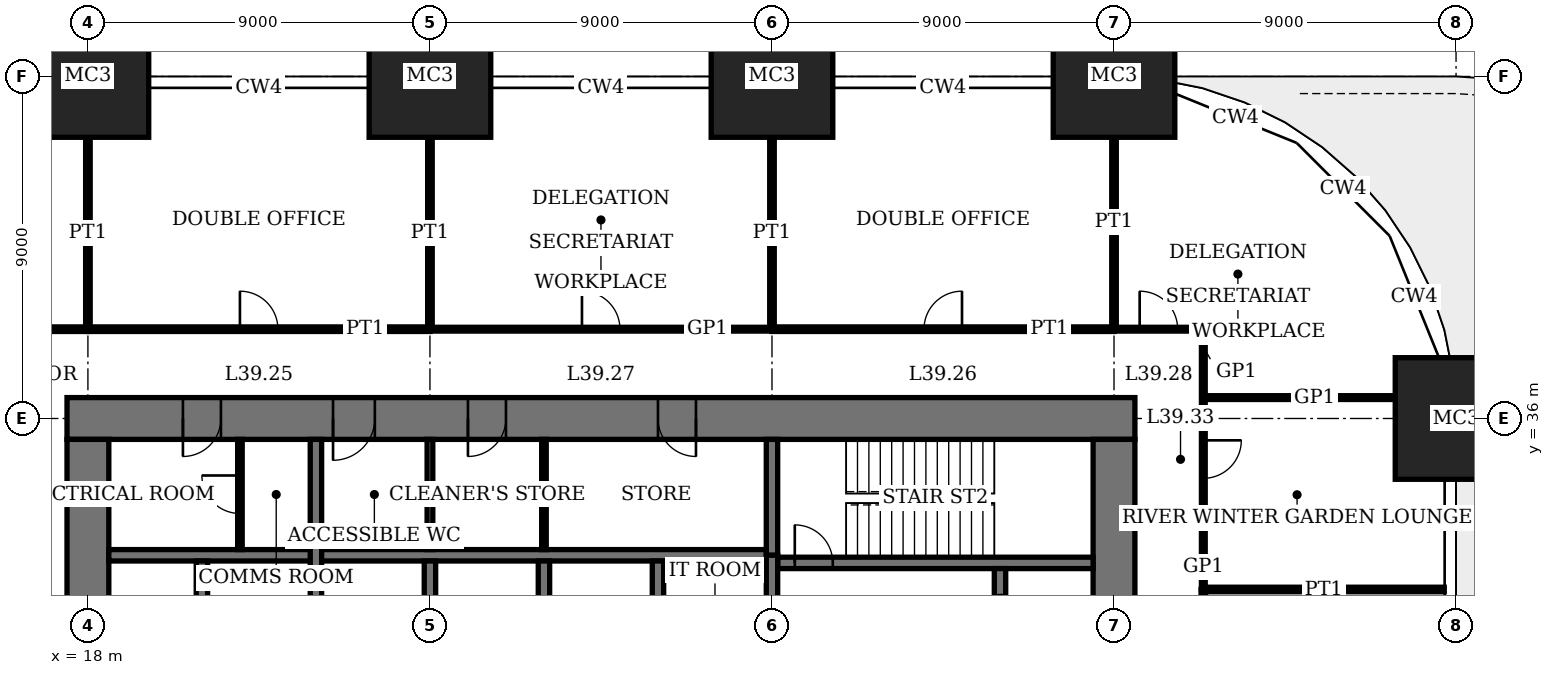
"""IFC4 building model, lengths in metres.
Left out: names, types, materials, properties, quantities, classifications, styles, units other than length and angle.
Written with IfcOpenShell. Run it as: python <this file> out.ifc"""

import sys

from ifc_helpers import new_model, si_unit, direction, frame, frame_2d, origin, origin_2d, place, context, subcontext, project, spatial, rectangle, extrude, element, fill, save


model = new_model("IFC4")
c1 = context("Model", 3, precision=1e-05, world=origin(), true_north=direction((0.0, 1.0)))
c2 = subcontext(c1, "Body", "Model", "MODEL_VIEW")
j1 = project(units=[si_unit("LENGTHUNIT", "METRE"), si_unit("PLANEANGLEUNIT", "RADIAN")], contexts=[c1])
p1 = place(None, origin())
s1 = spatial("IfcSite", under=j1, at=p1, CompositionType="ELEMENT")
p2 = place(p1, origin())
s2 = spatial("IfcBuilding", under=s1, at=p2, CompositionType="ELEMENT")
p3 = place(p2, frame((0.0, 0.0, 162.2)))
s3 = spatial("IfcBuildingStorey", under=s2, at=p3, CompositionType="ELEMENT", Elevation=162.2)
for number, where, z_axis, x_axis in (
    (1, (18.0, 45.0, 0.0), (0.0, 0.0, 1.0), (1.0, 0.0, 0.0)),
    (2, (27.0, 45.0, 0.0), (0.0, 0.0, 1.0), (1.0, 0.0, 0.0)),
    (3, (36.0, 45.0, 0.0), (0.0, 0.0, 1.0), (1.0, 0.0, 0.0)),
    (4, (45.0, 45.0, 0.0), (0.0, 0.0, 1.0), (1.0, 0.0, 0.0)),
    (5, (54.0, 36.0, 0.0), (0.0, 0.0, 1.0), (1.0, 0.0, 0.0)),
):
    element("IfcColumn", number, at=place(p3, frame(where, z_axis=z_axis, x_axis=x_axis)), inside=s3, PredefinedType="COLUMN", context=c2, shape_type="SweptSolid", body=[
        extrude(rectangle(XDim=3.2, YDim=3.2, at=origin_2d()), origin(), (0.0, 0.0, 1.0), 4.0),
    ])
p4 = place(p3, frame((45.55, 36.0, 0.0), z_axis=(0.0, 0.0, 1.0), x_axis=(-1.0, 0.0, 0.0)))
e6 = element("IfcWall", 6, at=p4, inside=s3, PredefinedType="SHEAR", context=c2, shape_type="SweptSolid", body=[
    extrude(rectangle(XDim=28.1, YDim=1.1, at=frame_2d((14.05, 0.0))), origin(), (0.0, 0.0, 1.0), 4.0),
])
p5 = place(p4, frame((11.55, 0.0, 0.0)))
e7 = element("IfcOpeningElement", 7, at=p5, cuts=e6, PredefinedType="OPENING", context=c2, shape_type="SweptSolid", body=[
    extrude(rectangle(XDim=1.0, YDim=2.4, at=frame_2d((0.5, 1.2))), frame((0.0, 0.56, 0.0), z_axis=(0.0, -1.0, 0.0), x_axis=(1.0, 0.0, 0.0)), (0.0, 0.0, 1.0), 1.12),
])
p6 = place(p4, frame((16.55, 0.0, 0.0)))
e8 = element("IfcOpeningElement", 8, at=p6, cuts=e6, PredefinedType="OPENING", context=c2, shape_type="SweptSolid", body=[
    extrude(rectangle(XDim=1.0, YDim=2.4, at=frame_2d((0.5, 1.2))), frame((0.0, 0.56, 0.0), z_axis=(0.0, -1.0, 0.0), x_axis=(1.0, 0.0, 0.0)), (0.0, 0.0, 1.0), 1.12),
])
p7 = place(p4, frame((20.0, 0.0, 0.0)))
e9 = element("IfcOpeningElement", 9, at=p7, cuts=e6, PredefinedType="OPENING", context=c2, shape_type="SweptSolid", body=[
    extrude(rectangle(XDim=1.1, YDim=2.4, at=frame_2d((0.55, 1.2))), frame((0.0, 0.56, 0.0), z_axis=(0.0, -1.0, 0.0), x_axis=(1.0, 0.0, 0.0)), (0.0, 0.0, 1.0), 1.12),
])
p8 = place(p4, frame((24.05, 0.0, 0.0)))
e10 = element("IfcOpeningElement", 10, at=p8, cuts=e6, PredefinedType="OPENING", context=c2, shape_type="SweptSolid", body=[
    extrude(rectangle(XDim=1.0, YDim=2.4, at=frame_2d((0.5, 1.2))), frame((0.0, 0.56, 0.0), z_axis=(0.0, -1.0, 0.0), x_axis=(1.0, 0.0, 0.0)), (0.0, 0.0, 1.0), 1.12),
])
p9 = place(p3, frame((18.0, 35.45, 0.0), z_axis=(0.0, 0.0, 1.0), x_axis=(0.0, -1.0, 0.0)))
e11 = element("IfcWall", 11, at=p9, inside=s3, PredefinedType="SHEAR", context=c2, shape_type="SweptSolid", body=[
    extrude(rectangle(XDim=16.9, YDim=1.1, at=frame_2d((8.45, 0.0))), origin(), (0.0, 0.0, 1.0), 4.0),
])
p10 = place(p9, frame((8.9, 0.0, 0.0)))
e12 = element("IfcOpeningElement", 12, at=p10, cuts=e11, PredefinedType="OPENING", context=c2, shape_type="SweptSolid", body=[
    extrude(rectangle(XDim=1.8, YDim=2.4, at=frame_2d((0.9, 1.2))), frame((0.0, 0.56, 0.0), z_axis=(0.0, -1.0, 0.0), x_axis=(1.0, 0.0, 0.0)), (0.0, 0.0, 1.0), 1.12),
])
p11 = place(p3, frame((45.0, 18.55, 0.0), z_axis=(0.0, 0.0, 1.0), x_axis=(0.0, 1.0, 0.0)))
e13 = element("IfcWall", 13, at=p11, inside=s3, PredefinedType="SHEAR", context=c2, shape_type="SweptSolid", body=[
    extrude(rectangle(XDim=16.9, YDim=1.1, at=frame_2d((8.45, 0.0))), origin(), (0.0, 0.0, 1.0), 4.0),
])
p12 = place(p11, frame((8.9, 0.0, 0.0)))
e14 = element("IfcOpeningElement", 14, at=p12, cuts=e13, PredefinedType="OPENING", context=c2, shape_type="SweptSolid", body=[
    extrude(rectangle(XDim=1.8, YDim=2.4, at=frame_2d((0.9, 1.2))), frame((0.0, 0.56, 0.0), z_axis=(0.0, -1.0, 0.0), x_axis=(1.0, 0.0, 0.0)), (0.0, 0.0, 1.0), 1.12),
])
p13 = place(p3, frame((36.15, 32.2, 0.0), z_axis=(0.0, 0.0, 1.0), x_axis=(1.0, 0.0, 0.0)))
e15 = element("IfcWall", 15, at=p13, inside=s3, PredefinedType="SHEAR", context=c2, shape_type="SweptSolid", body=[
    extrude(rectangle(XDim=8.3, YDim=0.3, at=frame_2d((4.15, 0.0))), origin(), (0.0, 0.0, 1.0), 4.0),
])
p14 = place(p13, frame((0.45, 0.0, 0.0)))
e16 = element("IfcOpeningElement", 16, at=p14, cuts=e15, PredefinedType="OPENING", context=c2, shape_type="SweptSolid", body=[
    extrude(rectangle(XDim=1.0, YDim=2.4, at=frame_2d((0.5, 1.2))), frame((0.0, 0.16, 0.0), z_axis=(0.0, -1.0, 0.0), x_axis=(1.0, 0.0, 0.0)), (0.0, 0.0, 1.0), 0.32),
])
p15 = place(p3, frame((36.0, 32.4, 0.0), z_axis=(0.0, 0.0, 1.0), x_axis=(0.0, 1.0, 0.0)))
e17 = element("IfcWall", 17, at=p15, inside=s3, PredefinedType="SHEAR", context=c2, shape_type="SweptSolid", body=[
    extrude(rectangle(XDim=3.05, YDim=0.3, at=frame_2d((1.525, 0.0))), origin(), (0.0, 0.0, 1.0), 4.0),
])
p16 = place(p3, frame((42.0, 29.55, 0.0), z_axis=(0.0, 0.0, 1.0), x_axis=(0.0, 1.0, 0.0)))
e18 = element("IfcWall", 18, at=p16, inside=s3, PredefinedType="SHEAR", context=c2, shape_type="SweptSolid", body=[
    extrude(rectangle(XDim=2.5, YDim=0.3, at=frame_2d((1.25, 0.0))), origin(), (0.0, 0.0, 1.0), 4.0),
])
p17 = place(p16, frame((0.7, 0.0, 0.0)))
e19 = element("IfcOpeningElement", 19, at=p17, cuts=e18, PredefinedType="OPENING", context=c2, shape_type="SweptSolid", body=[
    extrude(rectangle(XDim=1.1, YDim=2.4, at=frame_2d((0.55, 1.2))), frame((0.0, 0.16, 0.0), z_axis=(0.0, -1.0, 0.0), x_axis=(1.0, 0.0, 0.0)), (0.0, 0.0, 1.0), 0.32),
])
p18 = place(p3, frame((18.55, 32.4, 0.0), z_axis=(0.0, 0.0, 1.0), x_axis=(1.0, 0.0, 0.0)))
e20 = element("IfcWall", 20, at=p18, inside=s3, PredefinedType="SHEAR", context=c2, shape_type="SweptSolid", body=[
    extrude(rectangle(XDim=17.3, YDim=0.3, at=frame_2d((8.65, 0.0))), origin(), (0.0, 0.0, 1.0), 4.0),
])
for number, where, z_axis, x_axis in (
    (21, (33.0, 29.55, 0.0), (0.0, 0.0, 1.0), (0.0, 1.0, 0.0)),
    (22, (30.0, 29.55, 0.0), (0.0, 0.0, 1.0), (0.0, 1.0, 0.0)),
    (23, (27.0, 29.55, 0.0), (0.0, 0.0, 1.0), (0.0, 1.0, 0.0)),
):
    element("IfcWall", number, at=place(p3, frame(where, z_axis=z_axis, x_axis=x_axis)), inside=s3, PredefinedType="SHEAR", context=c2, shape_type="SweptSolid", body=[
        extrude(rectangle(XDim=2.7, YDim=0.3, at=frame_2d((1.35, 0.0))), origin(), (0.0, 0.0, 1.0), 4.0),
    ])
p19 = place(p3, frame((24.0, 29.55, 0.0), z_axis=(0.0, 0.0, 1.0), x_axis=(0.0, 1.0, 0.0)))
e24 = element("IfcWall", 24, at=p19, inside=s3, PredefinedType="SHEAR", context=c2, shape_type="SweptSolid", body=[
    extrude(rectangle(XDim=5.9, YDim=0.3, at=frame_2d((2.95, 0.0))), origin(), (0.0, 0.0, 1.0), 4.0),
])
p20 = place(p3, frame((21.0, 29.55, 0.0), z_axis=(0.0, 0.0, 1.0), x_axis=(0.0, 1.0, 0.0)))
e25 = element("IfcWall", 25, at=p20, inside=s3, PredefinedType="SHEAR", context=c2, shape_type="SweptSolid", body=[
    extrude(rectangle(XDim=2.7, YDim=0.3, at=frame_2d((1.35, 0.0))), origin(), (0.0, 0.0, 1.0), 4.0),
])
p21 = place(p3, frame((36.0, 29.55, 0.0), z_axis=(0.0, 0.0, 1.0), x_axis=(0.0, 1.0, 0.0)))
e26 = element("IfcWall", 26, at=p21, inside=s3, PredefinedType="SHEAR", context=c2, shape_type="SweptSolid", body=[
    extrude(rectangle(XDim=2.85, YDim=0.3, at=frame_2d((1.425, 0.0))), origin(), (0.0, 0.0, 1.0), 4.0),
])
p22 = place(p3, frame((47.35, 31.5, 0.0), z_axis=(0.0, 0.0, 1.0), x_axis=(1.0, 0.0, 0.0)))
e27 = element("IfcWall", 27, at=p22, inside=s3, PredefinedType="PARTITIONING", context=c2, shape_type="SweptSolid", body=[
    extrude(rectangle(XDim=6.34, YDim=0.12, at=frame_2d((3.17, 0.0))), origin(), (0.0, 0.0, 1.0), 3.1),
])
p23 = place(p3, frame((47.35, 36.55, 0.0), z_axis=(0.0, 0.0, 1.0), x_axis=(1.0, 0.0, 0.0)))
e28 = element("IfcWall", 28, at=p23, inside=s3, PredefinedType="PARTITIONING", context=c2, shape_type="SweptSolid", body=[
    extrude(rectangle(XDim=5.05, YDim=0.1, at=frame_2d((2.525, 0.0))), origin(), (0.0, 0.0, 1.0), 3.05),
])
p24 = place(p3, frame((9.0, 38.35, 0.0), z_axis=(0.0, 0.0, 1.0), x_axis=(1.0, 0.0, 0.0)))
e29 = element("IfcWall", 29, at=p24, inside=s3, PredefinedType="PARTITIONING", context=c2, shape_type="SweptSolid", body=[
    extrude(rectangle(XDim=9.0, YDim=0.12, at=frame_2d((4.5, 0.0))), origin(), (0.0, 0.0, 1.0), 3.75),
])
p25 = place(p24, frame((4.0, 0.0, 0.0)))
e30 = element("IfcOpeningElement", 30, at=p25, cuts=e29, PredefinedType="OPENING", context=c2, shape_type="SweptSolid", body=[
    extrude(rectangle(XDim=1.0, YDim=2.4, at=frame_2d((0.5, 1.2))), frame((0.0, 0.07, 0.0), z_axis=(0.0, -1.0, 0.0), x_axis=(1.0, 0.0, 0.0)), (0.0, 0.0, 1.0), 0.14),
])
p26 = place(p3, frame((18.0, 38.35, 0.0), z_axis=(0.0, 0.0, 1.0), x_axis=(1.0, 0.0, 0.0)))
e31 = element("IfcWall", 31, at=p26, inside=s3, PredefinedType="PARTITIONING", context=c2, shape_type="SweptSolid", body=[
    extrude(rectangle(XDim=9.0, YDim=0.12, at=frame_2d((4.5, 0.0))), origin(), (0.0, 0.0, 1.0), 3.75),
])
p27 = place(p26, frame((4.0, 0.0, 0.0)))
e32 = element("IfcOpeningElement", 32, at=p27, cuts=e31, PredefinedType="OPENING", context=c2, shape_type="SweptSolid", body=[
    extrude(rectangle(XDim=1.0, YDim=2.4, at=frame_2d((0.5, 1.2))), frame((0.0, 0.07, 0.0), z_axis=(0.0, -1.0, 0.0), x_axis=(1.0, 0.0, 0.0)), (0.0, 0.0, 1.0), 0.14),
])
p28 = place(p3, frame((36.0, 38.35, 0.0), z_axis=(0.0, 0.0, 1.0), x_axis=(1.0, 0.0, 0.0)))
e33 = element("IfcWall", 33, at=p28, inside=s3, PredefinedType="PARTITIONING", context=c2, shape_type="SweptSolid", body=[
    extrude(rectangle(XDim=9.0, YDim=0.12, at=frame_2d((4.5, 0.0))), origin(), (0.0, 0.0, 1.0), 3.75),
])
p29 = place(p28, frame((4.0, 0.0, 0.0)))
e34 = element("IfcOpeningElement", 34, at=p29, cuts=e33, PredefinedType="OPENING", context=c2, shape_type="SweptSolid", body=[
    extrude(rectangle(XDim=1.0, YDim=2.4, at=frame_2d((0.5, 1.2))), frame((0.0, 0.07, 0.0), z_axis=(0.0, -1.0, 0.0), x_axis=(1.0, 0.0, 0.0)), (0.0, 0.0, 1.0), 0.14),
])
p30 = place(p3, frame((27.0, 38.35, 0.0), z_axis=(0.0, 0.0, 1.0), x_axis=(1.0, 0.0, 0.0)))
e35 = element("IfcWall", 35, at=p30, inside=s3, PredefinedType="PARTITIONING", context=c2, shape_type="SweptSolid", body=[
    extrude(rectangle(XDim=9.0, YDim=0.1, at=frame_2d((4.5, 0.0))), origin(), (0.0, 0.0, 1.0), 3.75),
])
p31 = place(p30, frame((4.0, 0.0, 0.0)))
e36 = element("IfcOpeningElement", 36, at=p31, cuts=e35, PredefinedType="OPENING", context=c2, shape_type="SweptSolid", body=[
    extrude(rectangle(XDim=1.0, YDim=2.4, at=frame_2d((0.5, 1.2))), frame((0.0, 0.06, 0.0), z_axis=(0.0, -1.0, 0.0), x_axis=(1.0, 0.0, 0.0)), (0.0, 0.0, 1.0), 0.12),
])
p32 = place(p3, frame((45.0, 38.35, 0.0), z_axis=(0.0, 0.0, 1.0), x_axis=(1.0, 0.0, 0.0)))
e37 = element("IfcWall", 37, at=p32, inside=s3, PredefinedType="PARTITIONING", context=c2, shape_type="SweptSolid", body=[
    extrude(rectangle(XDim=2.35, YDim=0.1, at=frame_2d((1.175, 0.0))), origin(), (0.0, 0.0, 1.0), 3.75),
])
p33 = place(p32, frame((0.675, 0.0, 0.0)))
e38 = element("IfcOpeningElement", 38, at=p33, cuts=e37, PredefinedType="OPENING", context=c2, shape_type="SweptSolid", body=[
    extrude(rectangle(XDim=1.0, YDim=2.4, at=frame_2d((0.5, 1.2))), frame((0.0, 0.06, 0.0), z_axis=(0.0, -1.0, 0.0), x_axis=(1.0, 0.0, 0.0)), (0.0, 0.0, 1.0), 0.12),
])
for number, where, z_axis, x_axis in (
    (39, (18.0, 38.35, 0.0), (0.0, 0.0, 1.0), (0.0, 1.0, 0.0)),
    (40, (27.0, 38.35, 0.0), (0.0, 0.0, 1.0), (0.0, 1.0, 0.0)),
    (41, (36.0, 38.35, 0.0), (0.0, 0.0, 1.0), (0.0, 1.0, 0.0)),
    (42, (45.0, 38.35, 0.0), (0.0, 0.0, 1.0), (0.0, 1.0, 0.0)),
):
    element("IfcWall", number, at=place(p3, frame(where, z_axis=z_axis, x_axis=x_axis)), inside=s3, PredefinedType="PARTITIONING", context=c2, shape_type="SweptSolid", body=[
        extrude(rectangle(XDim=5.05, YDim=0.12, at=frame_2d((2.525, 0.0))), origin(), (0.0, 0.0, 1.0), 3.05),
    ])
p34 = place(p3, frame((47.35, 27.0, 0.0), z_axis=(0.0, 0.0, 1.0), x_axis=(0.0, 1.0, 0.0)))
e43 = element("IfcWall", 43, at=p34, inside=s3, PredefinedType="PARTITIONING", context=c2, shape_type="SweptSolid", body=[
    extrude(rectangle(XDim=4.5, YDim=0.12, at=frame_2d((2.25, 0.0))), origin(), (0.0, 0.0, 1.0), 3.75),
])
p35 = place(p34, frame((1.75, 0.0, 0.0)))
e44 = element("IfcOpeningElement", 44, at=p35, cuts=e43, PredefinedType="OPENING", context=c2, shape_type="SweptSolid", body=[
    extrude(rectangle(XDim=1.0, YDim=2.4, at=frame_2d((0.5, 1.2))), frame((0.0, 0.07, 0.0), z_axis=(0.0, -1.0, 0.0), x_axis=(1.0, 0.0, 0.0)), (0.0, 0.0, 1.0), 0.14),
])
p36 = place(p3, frame((47.35, 31.5, 0.0), z_axis=(0.0, 0.0, 1.0), x_axis=(0.0, 1.0, 0.0)))
e45 = element("IfcWall", 45, at=p36, inside=s3, PredefinedType="PARTITIONING", context=c2, shape_type="SweptSolid", body=[
    extrude(rectangle(XDim=6.85, YDim=0.1, at=frame_2d((3.425, 0.0))), origin(), (0.0, 0.0, 1.0), 3.75),
])
p37 = place(p36, frame((2.925, 0.0, 0.0)))
e46 = element("IfcOpeningElement", 46, at=p37, cuts=e45, PredefinedType="OPENING", context=c2, shape_type="SweptSolid", body=[
    extrude(rectangle(XDim=1.0, YDim=2.4, at=frame_2d((0.5, 1.2))), frame((0.0, 0.06, 0.0), z_axis=(0.0, -1.0, 0.0), x_axis=(1.0, 0.0, 0.0)), (0.0, 0.0, 1.0), 0.12),
])
p38 = place(p3, frame((30.0, 32.55, 0.0), z_axis=(0.0, 0.0, 1.0), x_axis=(0.0, 1.0, 0.0)))
e47 = element("IfcWall", 47, at=p38, inside=s3, PredefinedType="PARTITIONING", context=c2, shape_type="SweptSolid", body=[
    extrude(rectangle(XDim=2.9, YDim=0.12, at=frame_2d((1.45, 0.0))), origin(), (0.0, 0.0, 1.0), 3.75),
])
p39 = place(p3, frame((27.0, 32.55, 0.0), z_axis=(0.0, 0.0, 1.0), x_axis=(0.0, 1.0, 0.0)))
e48 = element("IfcWall", 48, at=p39, inside=s3, PredefinedType="PARTITIONING", context=c2, shape_type="SweptSolid", body=[
    extrude(rectangle(XDim=2.9, YDim=0.15, at=frame_2d((1.45, 0.0))), origin(), (0.0, 0.0, 1.0), 3.75),
])
p40 = place(p3, frame((22.0, 32.55, 0.0), z_axis=(0.0, 0.0, 1.0), x_axis=(0.0, 1.0, 0.0)))
e49 = element("IfcWall", 49, at=p40, inside=s3, PredefinedType="PARTITIONING", context=c2, shape_type="SweptSolid", body=[
    extrude(rectangle(XDim=2.9, YDim=0.12, at=frame_2d((1.45, 0.0))), origin(), (0.0, 0.0, 1.0), 3.75),
])
p41 = place(p40, frame((0.95, 0.0, 0.0)))
e50 = element("IfcOpeningElement", 50, at=p41, cuts=e49, PredefinedType="OPENING", context=c2, shape_type="SweptSolid", body=[
    extrude(rectangle(XDim=1.0, YDim=2.4, at=frame_2d((0.5, 1.2))), frame((0.0, 0.07, 0.0), z_axis=(0.0, -1.0, 0.0), x_axis=(1.0, 0.0, 0.0)), (0.0, 0.0, 1.0), 0.14),
])
p42 = place(p5, origin())
e51 = element("IfcDoor", 51, at=p42, inside=s3, OperationType="SINGLE_SWING_RIGHT", PredefinedType="DOOR", context=c2, shape_type="SweptSolid", body=[
    extrude(rectangle(XDim=1.0, YDim=2.4, at=frame_2d((0.5, 1.2))), frame((0.0, 0.025, 0.0), z_axis=(0.0, -1.0, 0.0), x_axis=(1.0, 0.0, 0.0)), (0.0, 0.0, 1.0), 0.05),
    extrude(rectangle(XDim=0.04, YDim=2.4, at=frame_2d((0.02, 1.2))), frame((0.0, 0.4, 0.0), z_axis=(0.0, -1.0, 0.0), x_axis=(1.0, 0.0, 0.0)), (0.0, 0.0, 1.0), 0.8),
    extrude(rectangle(XDim=0.04, YDim=2.4, at=frame_2d((0.98, 1.2))), frame((0.0, 0.4, 0.0), z_axis=(0.0, -1.0, 0.0), x_axis=(1.0, 0.0, 0.0)), (0.0, 0.0, 1.0), 0.8),
    extrude(rectangle(XDim=1.0, YDim=0.04, at=frame_2d((0.5, 2.38))), frame((0.0, 0.4, 0.0), z_axis=(0.0, -1.0, 0.0), x_axis=(1.0, 0.0, 0.0)), (0.0, 0.0, 1.0), 0.8),
])
fill(e7, e51)
p43 = place(p6, origin())
e52 = element("IfcDoor", 52, at=p43, inside=s3, OperationType="SINGLE_SWING_LEFT", PredefinedType="DOOR", context=c2, shape_type="SweptSolid", body=[
    extrude(rectangle(XDim=1.0, YDim=2.4, at=frame_2d((0.5, 1.2))), frame((0.0, 0.025, 0.0), z_axis=(0.0, -1.0, 0.0), x_axis=(1.0, 0.0, 0.0)), (0.0, 0.0, 1.0), 0.05),
    extrude(rectangle(XDim=0.04, YDim=2.4, at=frame_2d((0.02, 1.2))), frame((0.0, 0.4, 0.0), z_axis=(0.0, -1.0, 0.0), x_axis=(1.0, 0.0, 0.0)), (0.0, 0.0, 1.0), 0.8),
    extrude(rectangle(XDim=0.04, YDim=2.4, at=frame_2d((0.98, 1.2))), frame((0.0, 0.4, 0.0), z_axis=(0.0, -1.0, 0.0), x_axis=(1.0, 0.0, 0.0)), (0.0, 0.0, 1.0), 0.8),
    extrude(rectangle(XDim=1.0, YDim=0.04, at=frame_2d((0.5, 2.38))), frame((0.0, 0.4, 0.0), z_axis=(0.0, -1.0, 0.0), x_axis=(1.0, 0.0, 0.0)), (0.0, 0.0, 1.0), 0.8),
])
fill(e8, e52)
p44 = place(p7, origin())
e53 = element("IfcDoor", 53, at=p44, inside=s3, OperationType="SINGLE_SWING_LEFT", PredefinedType="DOOR", context=c2, shape_type="SweptSolid", body=[
    extrude(rectangle(XDim=1.1, YDim=2.4, at=frame_2d((0.55, 1.2))), frame((0.0, 0.025, 0.0), z_axis=(0.0, -1.0, 0.0), x_axis=(1.0, 0.0, 0.0)), (0.0, 0.0, 1.0), 0.05),
    extrude(rectangle(XDim=0.04, YDim=2.4, at=frame_2d((0.02, 1.2))), frame((0.0, 0.44, 0.0), z_axis=(0.0, -1.0, 0.0), x_axis=(1.0, 0.0, 0.0)), (0.0, 0.0, 1.0), 0.88),
    extrude(rectangle(XDim=0.04, YDim=2.4, at=frame_2d((1.08, 1.2))), frame((0.0, 0.44, 0.0), z_axis=(0.0, -1.0, 0.0), x_axis=(1.0, 0.0, 0.0)), (0.0, 0.0, 1.0), 0.88),
    extrude(rectangle(XDim=1.1, YDim=0.04, at=frame_2d((0.55, 2.38))), frame((0.0, 0.44, 0.0), z_axis=(0.0, -1.0, 0.0), x_axis=(1.0, 0.0, 0.0)), (0.0, 0.0, 1.0), 0.88),
])
fill(e9, e53)
p45 = place(p8, origin())
e54 = element("IfcDoor", 54, at=p45, inside=s3, OperationType="SINGLE_SWING_LEFT", PredefinedType="DOOR", context=c2, shape_type="SweptSolid", body=[
    extrude(rectangle(XDim=1.0, YDim=2.4, at=frame_2d((0.5, 1.2))), frame((0.0, 0.025, 0.0), z_axis=(0.0, -1.0, 0.0), x_axis=(1.0, 0.0, 0.0)), (0.0, 0.0, 1.0), 0.05),
    extrude(rectangle(XDim=0.04, YDim=2.4, at=frame_2d((0.02, 1.2))), frame((0.0, 0.4, 0.0), z_axis=(0.0, -1.0, 0.0), x_axis=(1.0, 0.0, 0.0)), (0.0, 0.0, 1.0), 0.8),
    extrude(rectangle(XDim=0.04, YDim=2.4, at=frame_2d((0.98, 1.2))), frame((0.0, 0.4, 0.0), z_axis=(0.0, -1.0, 0.0), x_axis=(1.0, 0.0, 0.0)), (0.0, 0.0, 1.0), 0.8),
    extrude(rectangle(XDim=1.0, YDim=0.04, at=frame_2d((0.5, 2.38))), frame((0.0, 0.4, 0.0), z_axis=(0.0, -1.0, 0.0), x_axis=(1.0, 0.0, 0.0)), (0.0, 0.0, 1.0), 0.8),
])
fill(e10, e54)
p46 = place(p14, origin())
e55 = element("IfcDoor", 55, at=p46, inside=s3, OperationType="SINGLE_SWING_RIGHT", PredefinedType="DOOR", context=c2, shape_type="SweptSolid", body=[
    extrude(rectangle(XDim=1.0, YDim=2.4, at=frame_2d((0.5, 1.2))), frame((0.0, 0.03, 0.0), z_axis=(0.0, -1.0, 0.0), x_axis=(1.0, 0.0, 0.0)), (0.0, 0.0, 1.0), 0.06),
])
fill(e16, e55)
p47 = place(p27, origin())
e56 = element("IfcDoor", 56, at=p47, inside=s3, OperationType="SINGLE_SWING_RIGHT", PredefinedType="DOOR", context=c2, shape_type="SweptSolid", body=[
    extrude(rectangle(XDim=1.0, YDim=2.4, at=frame_2d((0.5, 1.2))), frame((0.0, 0.025, 0.0), z_axis=(0.0, -1.0, 0.0), x_axis=(1.0, 0.0, 0.0)), (0.0, 0.0, 1.0), 0.05),
])
fill(e32, e56)
p48 = place(p29, origin())
e57 = element("IfcDoor", 57, at=p48, inside=s3, OperationType="SINGLE_SWING_LEFT", PredefinedType="DOOR", context=c2, shape_type="SweptSolid", body=[
    extrude(rectangle(XDim=1.0, YDim=2.4, at=frame_2d((0.5, 1.2))), frame((0.0, 0.025, 0.0), z_axis=(0.0, -1.0, 0.0), x_axis=(1.0, 0.0, 0.0)), (0.0, 0.0, 1.0), 0.05),
])
fill(e34, e57)
p49 = place(p31, origin())
e58 = element("IfcDoor", 58, at=p49, inside=s3, OperationType="SINGLE_SWING_RIGHT", PredefinedType="DOOR", context=c2, shape_type="SweptSolid", body=[
    extrude(rectangle(XDim=1.0, YDim=2.4, at=frame_2d((0.5, 1.2))), frame((0.0, 0.02, 0.0), z_axis=(0.0, -1.0, 0.0), x_axis=(1.0, 0.0, 0.0)), (0.0, 0.0, 1.0), 0.04),
])
fill(e36, e58)
p50 = place(p33, origin())
e59 = element("IfcDoor", 59, at=p50, inside=s3, OperationType="SINGLE_SWING_RIGHT", PredefinedType="DOOR", context=c2, shape_type="SweptSolid", body=[
    extrude(rectangle(XDim=1.0, YDim=2.4, at=frame_2d((0.5, 1.2))), frame((0.0, 0.02, 0.0), z_axis=(0.0, -1.0, 0.0), x_axis=(1.0, 0.0, 0.0)), (0.0, 0.0, 1.0), 0.04),
])
fill(e38, e59)
p51 = place(p37, origin())
e60 = element("IfcDoor", 60, at=p51, inside=s3, OperationType="SINGLE_SWING_RIGHT", PredefinedType="DOOR", context=c2, shape_type="SweptSolid", body=[
    extrude(rectangle(XDim=1.0, YDim=2.4, at=frame_2d((0.5, 1.2))), frame((0.0, 0.02, 0.0), z_axis=(0.0, -1.0, 0.0), x_axis=(1.0, 0.0, 0.0)), (0.0, 0.0, 1.0), 0.04),
])
fill(e46, e60)
p52 = place(p41, origin())
e61 = element("IfcDoor", 61, at=p52, inside=s3, OperationType="SINGLE_SWING_LEFT", PredefinedType="DOOR", context=c2, shape_type="SweptSolid", body=[
    extrude(rectangle(XDim=1.0, YDim=2.4, at=frame_2d((0.5, 1.2))), frame((0.0, 0.03, 0.0), z_axis=(0.0, -1.0, 0.0), x_axis=(1.0, 0.0, 0.0)), (0.0, 0.0, 1.0), 0.06),
])
fill(e50, e61)
save(model, sys.argv[1])
